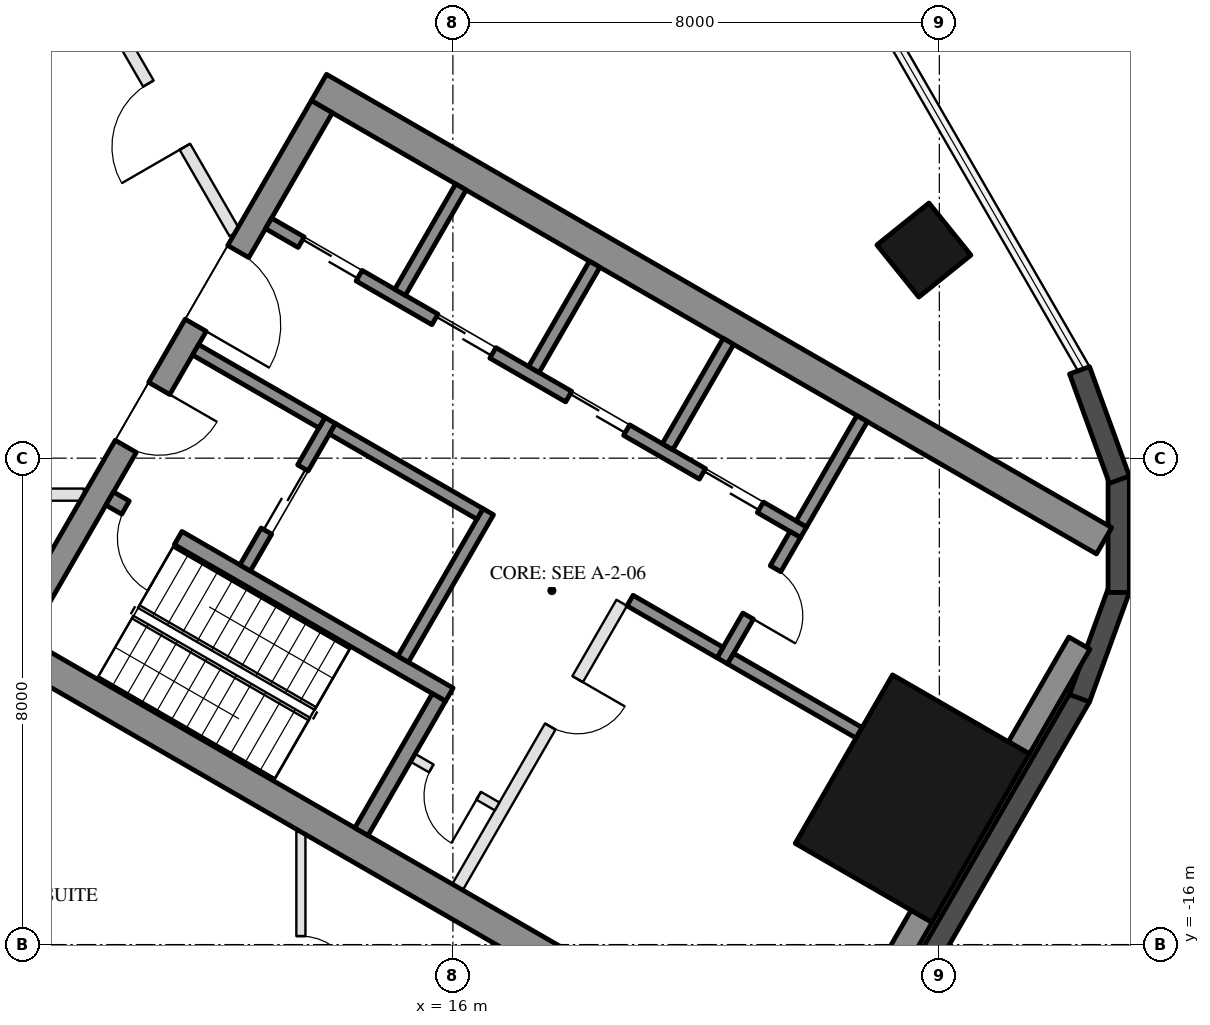
"""IFC4 building model, lengths in metres.
Left out: names, types, materials, properties, quantities, classifications, styles, units other than length and angle.
Written with IfcOpenShell. Run it as: python <this file> out.ifc"""

import sys

from ifc_helpers import new_model, si_unit, direction, frame, frame_2d, origin, origin_2d, place, context, subcontext, project, spatial, rectangle, hollow_rectangle, extrude, boolean, halfspace, element, fill, save


model = new_model("IFC4")
c1 = context("Model", 3, precision=1e-05, world=origin(), true_north=direction((0.0, 1.0)))
c2 = subcontext(c1, "Body", "Model", "MODEL_VIEW")
j1 = project(units=[si_unit("LENGTHUNIT", "METRE"), si_unit("PLANEANGLEUNIT", "RADIAN")], contexts=[c1])
p1 = place(None, origin())
s1 = spatial("IfcSite", under=j1, at=p1, CompositionType="ELEMENT")
p2 = place(p1, origin())
s2 = spatial("IfcBuilding", under=s1, at=p2, CompositionType="ELEMENT")
p3 = place(p2, frame((0.0, 0.0, 33.0)))
s3 = spatial("IfcBuildingStorey", under=s2, at=p3, CompositionType="ELEMENT", Elevation=33.0)
p4 = place(p3, frame((23.746, -4.577, 0.0), z_axis=(-0.01301970202, 0.00206145282, 0.999913115111), x_axis=(0.497599356322, -0.867367587298, 0.008267351011)))
e1 = element("IfcColumn", 1, at=p4, inside=s3, PredefinedType="COLUMN", context=c2, shape_type="SweptSolid", body=[
    boolean("DIFFERENCE", boolean("DIFFERENCE", extrude(hollow_rectangle(XDim=1.1, YDim=1.1, WallThickness=0.05, at=origin_2d()), origin(), (0.0, 0.0, 1.0), 4.5), halfspace(frame((0.0, 0.0, 0.012), z_axis=(0.0, 0.0, 1.0), x_axis=(1.0, 0.0, 0.0)), True)), halfspace(frame((0.0, 0.0, 4.493), z_axis=(0.0, 0.0, 1.0), x_axis=(1.0, 0.0, 0.0)), False)),
])
p5 = place(p3, frame((23.556, -13.6, 0.0), z_axis=(0.0, 0.0, 1.0), x_axis=(0.5, 0.866025403784, 0.0)))
e2 = element("IfcColumn", 2, at=p5, inside=s3, PredefinedType="COLUMN", context=c2, shape_type="SweptSolid", body=[
    extrude(hollow_rectangle(XDim=3.2, YDim=2.6, WallThickness=0.08, at=origin_2d()), origin(), (0.0, 0.0, 1.0), 4.5),
])
p6 = place(p3, frame((23.483, -16.832, 0.0), z_axis=(0.0, 0.0, 1.0), x_axis=(0.499982068559, 0.866035756259, 0.0)))
e3 = element("IfcWall", 3, at=p6, inside=s3, PredefinedType="SOLIDWALL", context=c2, shape_type="SweptSolid", body=[
    extrude(rectangle(XDim=5.671, YDim=0.35, at=frame_2d((2.835, 0.0))), origin(), (0.0, 0.0, 1.0), 4.2),
])
for number, where, z_axis, x_axis in (
    (4, (26.305, -11.948, 0.0), (0.0, 0.0, 1.0), (0.342, 0.94, 0.0)),
    (5, (26.95, -10.209, 0.0), (0.0, 0.0, 1.0), (0.0, 1.0, 0.0)),
    (6, (26.96, -8.354, 0.0), (0.0, 0.0, 1.0), (-0.342, 0.94, 0.0)),
):
    element("IfcWall", number, at=place(p3, frame(where, z_axis=z_axis, x_axis=x_axis)), inside=s3, PredefinedType="SOLIDWALL", context=c2, shape_type="SweptSolid", body=[
        extrude(rectangle(XDim=1.915, YDim=0.35, at=frame_2d((0.957, 0.0))), origin(), (0.0, 0.0, 1.0), 4.2),
    ])
for number, where, z_axis, x_axis in (
    (7, (8.547, -10.997, 0.0), (0.0, 0.0, 1.0), (0.866, -0.5, 0.0)),
    (8, (13.797, -1.903, 0.0), (0.0, 0.0, 1.0), (0.866, -0.5, 0.0)),
):
    element("IfcWall", number, at=place(p3, frame(where, z_axis=z_axis, x_axis=x_axis)), inside=s3, PredefinedType="SHEAR", context=c2, shape_type="SweptSolid", body=[
        extrude(rectangle(XDim=14.91, YDim=0.5, at=frame_2d((7.455, 0.0))), origin(), (0.0, 0.0, 1.0), 4.2),
    ])
p7 = place(p3, frame((8.845, -10.88, 0.0), z_axis=(0.0, 0.0, 1.0), x_axis=(0.500004234368, 0.866022959057, 0.0)))
e9 = element("IfcWall", 9, at=p7, inside=s3, PredefinedType="SHEAR", context=c2, shape_type="SweptSolid", body=[
    extrude(rectangle(XDim=10.0, YDim=0.4, at=frame_2d((5.0, 0.0))), origin(), (0.0, 0.0, 1.0), 4.2),
])
p8 = place(p7, frame((3.55, 0.0, 0.0)))
e10 = element("IfcOpeningElement", 10, at=p8, cuts=e9, PredefinedType="OPENING", context=c2, shape_type="SweptSolid", body=[
    extrude(rectangle(XDim=1.1, YDim=2.1, at=frame_2d((0.55, 1.05))), frame((0.0, 0.21, 0.0), z_axis=(0.0, -1.0, 0.0), x_axis=(1.0, 0.0, 0.0)), (0.0, 0.0, 1.0), 0.42),
])
p9 = place(p7, frame((5.85, 0.0, 0.0)))
e11 = element("IfcOpeningElement", 11, at=p9, cuts=e9, PredefinedType="OPENING", context=c2, shape_type="SweptSolid", body=[
    extrude(rectangle(XDim=1.4, YDim=2.1, at=frame_2d((0.7, 1.05))), frame((0.0, 0.21, 0.0), z_axis=(0.0, -1.0, 0.0), x_axis=(1.0, 0.0, 0.0)), (0.0, 0.0, 1.0), 0.42),
])
for number, where, z_axis, x_axis in (
    (12, (25.309, -12.764, 0.0), (0.0, 0.0, 1.0), (0.5, 0.866, 0.0)),
    (13, (22.714, -17.258, 0.0), (0.0, 0.0, 1.0), (0.5, 0.866, 0.0)),
):
    element("IfcWall", number, at=place(p3, frame(where, z_axis=z_axis, x_axis=x_axis)), inside=s3, PredefinedType="SHEAR", context=c2, shape_type="SweptSolid", body=[
        extrude(rectangle(XDim=1.989, YDim=0.4, at=frame_2d((0.995, 0.0))), origin(), (0.0, 0.0, 1.0), 4.2),
    ])
p10 = place(p3, frame((10.356, -8.664, 0.0), z_axis=(0.0, 0.0, 1.0), x_axis=(0.866028629588, -0.499994412703, 0.0)))
e14 = element("IfcWall", 14, at=p10, inside=s3, PredefinedType="SHEAR", context=c2, shape_type="SweptSolid", body=[
    extrude(rectangle(XDim=6.45, YDim=0.25, at=frame_2d((3.225, 0.0))), origin(), (0.0, 0.0, 1.0), 4.2),
])
p11 = place(p10, frame((0.3, 0.0, 0.0)))
e15 = element("IfcOpeningElement", 15, at=p11, cuts=e14, PredefinedType="OPENING", context=c2, shape_type="SweptSolid", body=[
    extrude(rectangle(XDim=1.0, YDim=2.1, at=frame_2d((0.5, 1.05))), frame((0.0, 0.135, 0.0), z_axis=(0.0, -1.0, 0.0), x_axis=(1.0, 0.0, 0.0)), (0.0, 0.0, 1.0), 0.27),
])
p12 = place(p3, frame((14.496, -14.143, 0.0), z_axis=(0.0, 0.0, 1.0), x_axis=(0.500062241894, 0.865989465428, 0.0)))
e16 = element("IfcWall", 16, at=p12, inside=s3, PredefinedType="SHEAR", context=c2, shape_type="SweptSolid", body=[
    extrude(rectangle(XDim=2.55, YDim=0.25, at=frame_2d((1.275, 0.0))), origin(), (0.0, 0.0, 1.0), 4.2),
])
p13 = place(p3, frame((15.181, -11.305, 0.0), z_axis=(0.0, 0.0, 1.0), x_axis=(0.49994636267, 0.866056369097, 0.0)))
e17 = element("IfcWall", 17, at=p13, inside=s3, PredefinedType="SHEAR", context=c2, shape_type="SweptSolid", body=[
    extrude(rectangle(XDim=2.8, YDim=0.2, at=frame_2d((1.4, 0.0))), origin(), (0.0, 0.0, 1.0), 4.2),
])
p14 = place(p3, frame((12.583, -9.805, 0.0), z_axis=(0.0, 0.0, 1.0), x_axis=(0.49994636267, 0.866056369097, 0.0)))
e18 = element("IfcWall", 18, at=p14, inside=s3, PredefinedType="SHEAR", context=c2, shape_type="SweptSolid", body=[
    extrude(rectangle(XDim=2.8, YDim=0.2, at=frame_2d((1.4, 0.0))), origin(), (0.0, 0.0, 1.0), 4.2),
])
p15 = place(p14, frame((0.7, 0.0, 0.0)))
e19 = element("IfcOpeningElement", 19, at=p15, cuts=e18, PredefinedType="OPENING", context=c2, shape_type="SweptSolid", body=[
    extrude(rectangle(XDim=1.2, YDim=2.1, at=frame_2d((0.6, 1.05))), frame((0.0, 0.11, 0.0), z_axis=(0.0, -1.0, 0.0), x_axis=(1.0, 0.0, 0.0)), (0.0, 0.0, 1.0), 0.22),
])
p16 = place(p3, frame((11.768, -6.217, 0.0), z_axis=(0.0, 0.0, 1.0), x_axis=(0.866050077142, -0.499957262057, 0.0)))
e20 = element("IfcWall", 20, at=p16, inside=s3, PredefinedType="SHEAR", context=c2, shape_type="SweptSolid", body=[
    extrude(rectangle(XDim=2.4, YDim=0.2, at=frame_2d((1.2, 0.0))), origin(), (0.0, 0.0, 1.0), 4.2),
])
p17 = place(p3, frame((14.02, -7.517, 0.0), z_axis=(0.0, 0.0, 1.0), x_axis=(0.866034573852, -0.49998411664, 0.0)))
e21 = element("IfcWall", 21, at=p17, inside=s3, PredefinedType="SHEAR", context=c2, shape_type="SweptSolid", body=[
    extrude(rectangle(XDim=2.8, YDim=0.2, at=frame_2d((1.4, 0.0))), origin(), (0.0, 0.0, 1.0), 4.2),
])
p18 = place(p3, frame((12.968, -4.138, 0.0), z_axis=(0.0, 0.0, 1.0), x_axis=(0.866028328073, -0.49999493495, 0.0)))
e22 = element("IfcWall", 22, at=p18, inside=s3, PredefinedType="SHEAR", context=c2, shape_type="SweptSolid", body=[
    extrude(rectangle(XDim=10.16, YDim=0.2, at=frame_2d((5.08, 0.0))), origin(), (0.0, 0.0, 1.0), 4.2),
])
p19 = place(p18, frame((0.62, 0.0, 0.0)))
e23 = element("IfcOpeningElement", 23, at=p19, cuts=e22, PredefinedType="OPENING", context=c2, shape_type="SweptSolid", body=[
    extrude(rectangle(XDim=1.1, YDim=2.1, at=frame_2d((0.55, 1.05))), frame((0.0, 0.11, 0.0), z_axis=(0.0, -1.0, 0.0), x_axis=(1.0, 0.0, 0.0)), (0.0, 0.0, 1.0), 0.22),
])
p20 = place(p18, frame((3.16, 0.0, 0.0)))
e24 = element("IfcOpeningElement", 24, at=p20, cuts=e22, PredefinedType="OPENING", context=c2, shape_type="SweptSolid", body=[
    extrude(rectangle(XDim=1.1, YDim=2.1, at=frame_2d((0.55, 1.05))), frame((0.0, 0.11, 0.0), z_axis=(0.0, -1.0, 0.0), x_axis=(1.0, 0.0, 0.0)), (0.0, 0.0, 1.0), 0.22),
])
p21 = place(p18, frame((5.7, 0.0, 0.0)))
e25 = element("IfcOpeningElement", 25, at=p21, cuts=e22, PredefinedType="OPENING", context=c2, shape_type="SweptSolid", body=[
    extrude(rectangle(XDim=1.1, YDim=2.1, at=frame_2d((0.55, 1.05))), frame((0.0, 0.11, 0.0), z_axis=(0.0, -1.0, 0.0), x_axis=(1.0, 0.0, 0.0)), (0.0, 0.0, 1.0), 0.22),
])
p22 = place(p18, frame((8.24, 0.0, 0.0)))
e26 = element("IfcOpeningElement", 26, at=p22, cuts=e22, PredefinedType="OPENING", context=c2, shape_type="SweptSolid", body=[
    extrude(rectangle(XDim=1.1, YDim=2.1, at=frame_2d((0.55, 1.05))), frame((0.0, 0.11, 0.0), z_axis=(0.0, -1.0, 0.0), x_axis=(1.0, 0.0, 0.0)), (0.0, 0.0, 1.0), 0.22),
])
p23 = place(p3, frame((20.43, -11.333, 0.0), z_axis=(0.0, 0.0, 1.0), x_axis=(0.500001309137, 0.866024647952, 0.0)))
e27 = element("IfcWall", 27, at=p23, inside=s3, PredefinedType="SHEAR", context=c2, shape_type="SweptSolid", body=[
    extrude(rectangle(XDim=2.4, YDim=0.2, at=frame_2d((1.2, 0.0))), origin(), (0.0, 0.0, 1.0), 4.2),
])
p24 = place(p23, frame((0.85, 0.0, 0.0)))
e28 = element("IfcOpeningElement", 28, at=p24, cuts=e27, PredefinedType="OPENING", context=c2, shape_type="SweptSolid", body=[
    extrude(rectangle(XDim=0.9, YDim=2.1, at=frame_2d((0.45, 1.05))), frame((0.0, 0.11, 0.0), z_axis=(0.0, -1.0, 0.0), x_axis=(1.0, 0.0, 0.0)), (0.0, 0.0, 1.0), 0.22),
])
p25 = place(p3, frame((18.913, -10.342, 0.0), z_axis=(0.0, 0.0, 1.0), x_axis=(0.866038183914, -0.499977863513, 0.0)))
e29 = element("IfcWall", 29, at=p25, inside=s3, PredefinedType="SHEAR", context=c2, shape_type="SweptSolid", body=[
    extrude(rectangle(XDim=1.71, YDim=0.2, at=frame_2d((0.855, 0.0))), origin(), (0.0, 0.0, 1.0), 4.2),
])
for number, where, z_axis, x_axis in (
    (30, (15.131, -5.272, 0.0), (0.0, 0.0, 1.0), (0.5, 0.866, 0.0)),
    (31, (17.331, -6.542, 0.0), (0.0, 0.0, 1.0), (0.5, 0.866, 0.0)),
    (32, (19.531, -7.812, 0.0), (0.0, 0.0, 1.0), (0.5, 0.866, 0.0)),
    (33, (21.73, -9.082, 0.0), (0.0, 0.0, 1.0), (0.5, 0.866, 0.0)),
):
    element("IfcWall", number, at=place(p3, frame(where, z_axis=z_axis, x_axis=x_axis)), inside=s3, PredefinedType="SHEAR", context=c2, shape_type="SweptSolid", body=[
        extrude(rectangle(XDim=2.0, YDim=0.2, at=frame_2d((1.0, 0.0))), origin(), (0.0, 0.0, 1.0), 4.2),
    ])
p26 = place(p3, frame((20.567, -11.297, 0.0), z_axis=(0.0, 0.0, 1.0), x_axis=(0.866048967903, -0.499959183527, 0.0)))
e34 = element("IfcWall", 34, at=p26, inside=s3, PredefinedType="SHEAR", context=c2, shape_type="SweptSolid", body=[
    extrude(rectangle(XDim=2.44, YDim=0.2, at=frame_2d((1.22, 0.0))), origin(), (0.0, 0.0, 1.0), 4.2),
])
p27 = place(p3, frame((16.076, -15.055, 0.0), z_axis=(0.0, 0.0, 1.0), x_axis=(0.499995103361, 0.866028230842, 0.0)))
e35 = element("IfcWall", 35, at=p27, inside=s3, PredefinedType="PARTITIONING", context=c2, shape_type="SweptSolid", body=[
    extrude(rectangle(XDim=5.4, YDim=0.2, at=frame_2d((2.7, 0.0))), origin(), (0.0, 0.0, 1.0), 4.2),
])
p28 = place(p27, frame((3.05, 0.0, 0.0)))
e36 = element("IfcOpeningElement", 36, at=p28, cuts=e35, PredefinedType="OPENING", context=c2, shape_type="SweptSolid", body=[
    extrude(rectangle(XDim=0.9, YDim=2.1, at=frame_2d((0.45, 1.05))), frame((0.0, 0.11, 0.0), z_axis=(0.0, -1.0, 0.0), x_axis=(1.0, 0.0, 0.0)), (0.0, 0.0, 1.0), 0.22),
])
p29 = place(p3, frame((15.342, -12.928, 0.0), z_axis=(0.0, 0.0, 1.0), x_axis=(0.865989903783, -0.500061482766, 0.0)))
e37 = element("IfcWall", 37, at=p29, inside=s3, PredefinedType="PARTITIONING", context=c2, shape_type="SweptSolid", body=[
    extrude(rectangle(XDim=1.6, YDim=0.15, at=frame_2d((0.8, 0.0))), origin(), (0.0, 0.0, 1.0), 4.2),
])
p30 = place(p29, frame((0.35, 0.0, 0.0)))
e38 = element("IfcOpeningElement", 38, at=p30, cuts=e37, PredefinedType="OPENING", context=c2, shape_type="SweptSolid", body=[
    extrude(rectangle(XDim=0.9, YDim=2.1, at=frame_2d((0.45, 1.05))), frame((0.0, 0.085, 0.0), z_axis=(0.0, -1.0, 0.0), x_axis=(1.0, 0.0, 0.0)), (0.0, 0.0, 1.0), 0.17),
])
p31 = place(p3, frame((13.5, -19.476, 0.0), z_axis=(0.0, 0.0, 1.0), x_axis=(0.0, 1.0, 0.0)))
e39 = element("IfcWall", 39, at=p31, inside=s3, PredefinedType="PARTITIONING", context=c2, shape_type="SweptSolid", body=[
    extrude(rectangle(XDim=5.331, YDim=0.15, at=frame_2d((2.666, 0.0))), origin(), (0.0, 0.0, 1.0), 4.2),
])
p32 = place(p31, frame((2.716, 0.0, 0.0)))
e40 = element("IfcOpeningElement", 40, at=p32, cuts=e39, PredefinedType="OPENING", context=c2, shape_type="SweptSolid", body=[
    extrude(rectangle(XDim=0.9, YDim=2.1, at=frame_2d((0.45, 1.05))), frame((0.0, 0.085, 0.0), z_axis=(0.0, -1.0, 0.0), x_axis=(1.0, 0.0, 0.0)), (0.0, 0.0, 1.0), 0.17),
])
p33 = place(p3, frame((-9.93, -8.6, 0.0), z_axis=(0.0, 0.0, 1.0), x_axis=(1.0, 0.0, 0.0)))
e41 = element("IfcWall", 41, at=p33, inside=s3, PredefinedType="PARTITIONING", context=c2, shape_type="SweptSolid", body=[
    extrude(rectangle(XDim=19.861, YDim=0.2, at=frame_2d((9.93, 0.0))), origin(), (0.0, 0.0, 1.0), 3.41),
])
p34 = place(p33, frame((2.234, 0.0, 0.0)))
e42 = element("IfcOpeningElement", 42, at=p34, cuts=e41, PredefinedType="OPENING", context=c2, shape_type="SweptSolid", body=[
    extrude(rectangle(XDim=1.5, YDim=2.1, at=frame_2d((0.75, 1.05))), frame((0.0, 0.11, 0.0), z_axis=(0.0, -1.0, 0.0), x_axis=(1.0, 0.0, 0.0)), (0.0, 0.0, 1.0), 0.22),
])
p35 = place(p33, frame((12.278, 0.0, 0.0)))
e43 = element("IfcOpeningElement", 43, at=p35, cuts=e41, PredefinedType="OPENING", context=c2, shape_type="SweptSolid", body=[
    extrude(rectangle(XDim=1.2, YDim=2.1, at=frame_2d((0.6, 1.05))), frame((0.0, 0.11, 0.0), z_axis=(0.0, -1.0, 0.0), x_axis=(1.0, 0.0, 0.0)), (0.0, 0.0, 1.0), 0.22),
])
p36 = place(p3, frame((12.413, -4.3, 0.0), z_axis=(0.0, 0.0, 1.0), x_axis=(-0.50000478328, 0.866022642139, 0.0)))
e44 = element("IfcWall", 44, at=p36, inside=s3, PredefinedType="PARTITIONING", context=c2, shape_type="SweptSolid", body=[
    extrude(rectangle(XDim=19.861, YDim=0.2, at=frame_2d((9.931, 0.0))), origin(), (0.0, 0.0, 1.0), 3.41),
])
p37 = place(p36, frame((1.642, 0.0, 0.0)))
e45 = element("IfcOpeningElement", 45, at=p37, cuts=e44, PredefinedType="OPENING", context=c2, shape_type="SweptSolid", body=[
    extrude(rectangle(XDim=1.2, YDim=2.1, at=frame_2d((0.6, 1.05))), frame((0.0, 0.11, 0.0), z_axis=(0.0, -1.0, 0.0), x_axis=(1.0, 0.0, 0.0)), (0.0, 0.0, 1.0), 0.22),
])
p38 = place(p36, frame((6.125, 0.0, 0.0)))
e46 = element("IfcOpeningElement", 46, at=p38, cuts=e44, PredefinedType="OPENING", context=c2, shape_type="SweptSolid", body=[
    extrude(rectangle(XDim=1.2, YDim=2.1, at=frame_2d((0.6, 1.05))), frame((0.0, 0.11, 0.0), z_axis=(0.0, -1.0, 0.0), x_axis=(1.0, 0.0, 0.0)), (0.0, 0.0, 1.0), 0.22),
])
p39 = place(p36, frame((9.918, 0.0, 0.0)))
e47 = element("IfcOpeningElement", 47, at=p39, cuts=e44, PredefinedType="OPENING", context=c2, shape_type="SweptSolid", body=[
    extrude(rectangle(XDim=1.0, YDim=2.1, at=frame_2d((0.5, 1.05))), frame((0.0, 0.11, 0.0), z_axis=(0.0, -1.0, 0.0), x_axis=(1.0, 0.0, 0.0)), (0.0, 0.0, 1.0), 0.22),
])
p40 = place(p36, frame((17.34, 0.0, 0.0)))
e48 = element("IfcOpeningElement", 48, at=p40, cuts=e44, PredefinedType="OPENING", context=c2, shape_type="SweptSolid", body=[
    extrude(rectangle(XDim=1.5, YDim=2.1, at=frame_2d((0.75, 1.05))), frame((0.0, 0.11, 0.0), z_axis=(0.0, -1.0, 0.0), x_axis=(1.0, 0.0, 0.0)), (0.0, 0.0, 1.0), 0.22),
])
p41 = place(p36, frame((13.23, 0.0, 0.0)))
e49 = element("IfcOpeningElement", 49, at=p41, cuts=e44, PredefinedType="OPENING", context=c2, shape_type="SweptSolid", body=[
    extrude(rectangle(XDim=1.8, YDim=2.1, at=frame_2d((0.9, 1.05))), frame((0.0, 0.11, 0.0), z_axis=(0.0, -1.0, 0.0), x_axis=(1.0, 0.0, 0.0)), (0.0, 0.0, 1.0), 0.22),
])
p42 = place(p15, origin())
e50 = element("IfcDoor", 50, at=p42, inside=s3, OperationType="DOUBLE_DOOR_SLIDING", PredefinedType="DOOR", context=c2, shape_type="SweptSolid", body=[
    extrude(rectangle(XDim=1.2, YDim=2.1, at=frame_2d((0.6, 1.05))), frame((0.0, 0.025, 0.0), z_axis=(0.0, -1.0, 0.0), x_axis=(1.0, 0.0, 0.0)), (0.0, 0.0, 1.0), 0.05),
])
fill(e19, e50)
p43 = place(p30, frame((0.9, 0.0, 0.0), z_axis=(0.0, 0.0, 1.0), x_axis=(-1.0, 0.0, 0.0)))
e51 = element("IfcDoor", 51, at=p43, inside=s3, OperationType="SINGLE_SWING_LEFT", PredefinedType="DOOR", context=c2, shape_type="SweptSolid", body=[
    extrude(rectangle(XDim=0.9, YDim=2.1, at=frame_2d((0.45, 1.05))), frame((0.0, 0.025, 0.0), z_axis=(0.0, -1.0, 0.0), x_axis=(1.0, 0.0, 0.0)), (0.0, 0.0, 1.0), 0.05),
])
fill(e38, e51)
p44 = place(p19, origin())
e52 = element("IfcDoor", 52, at=p44, inside=s3, OperationType="DOUBLE_DOOR_SLIDING", PredefinedType="DOOR", context=c2, shape_type="SweptSolid", body=[
    extrude(rectangle(XDim=1.1, YDim=2.1, at=frame_2d((0.55, 1.05))), frame((0.0, 0.025, 0.0), z_axis=(0.0, -1.0, 0.0), x_axis=(1.0, 0.0, 0.0)), (0.0, 0.0, 1.0), 0.05),
])
fill(e23, e52)
p45 = place(p20, origin())
e53 = element("IfcDoor", 53, at=p45, inside=s3, OperationType="DOUBLE_DOOR_SLIDING", PredefinedType="DOOR", context=c2, shape_type="SweptSolid", body=[
    extrude(rectangle(XDim=1.1, YDim=2.1, at=frame_2d((0.55, 1.05))), frame((0.0, 0.025, 0.0), z_axis=(0.0, -1.0, 0.0), x_axis=(1.0, 0.0, 0.0)), (0.0, 0.0, 1.0), 0.05),
])
fill(e24, e53)
p46 = place(p21, origin())
e54 = element("IfcDoor", 54, at=p46, inside=s3, OperationType="DOUBLE_DOOR_SLIDING", PredefinedType="DOOR", context=c2, shape_type="SweptSolid", body=[
    extrude(rectangle(XDim=1.1, YDim=2.1, at=frame_2d((0.55, 1.05))), frame((0.0, 0.025, 0.0), z_axis=(0.0, -1.0, 0.0), x_axis=(1.0, 0.0, 0.0)), (0.0, 0.0, 1.0), 0.05),
])
fill(e25, e54)
p47 = place(p22, origin())
e55 = element("IfcDoor", 55, at=p47, inside=s3, OperationType="DOUBLE_DOOR_SLIDING", PredefinedType="DOOR", context=c2, shape_type="SweptSolid", body=[
    extrude(rectangle(XDim=1.1, YDim=2.1, at=frame_2d((0.55, 1.05))), frame((0.0, 0.025, 0.0), z_axis=(0.0, -1.0, 0.0), x_axis=(1.0, 0.0, 0.0)), (0.0, 0.0, 1.0), 0.05),
])
fill(e26, e55)
p48 = place(p24, frame((0.9, 0.0, 0.0), z_axis=(0.0, 0.0, 1.0), x_axis=(-1.0, 0.0, 0.0)))
e56 = element("IfcDoor", 56, at=p48, inside=s3, OperationType="SINGLE_SWING_RIGHT", PredefinedType="DOOR", context=c2, shape_type="SweptSolid", body=[
    extrude(rectangle(XDim=0.9, YDim=2.1, at=frame_2d((0.45, 1.05))), frame((0.0, 0.025, 0.0), z_axis=(0.0, -1.0, 0.0), x_axis=(1.0, 0.0, 0.0)), (0.0, 0.0, 1.0), 0.05),
])
fill(e28, e56)
p49 = place(p28, frame((0.9, 0.0, 0.0), z_axis=(0.0, 0.0, 1.0), x_axis=(-1.0, 0.0, 0.0)))
e57 = element("IfcDoor", 57, at=p49, inside=s3, OperationType="SINGLE_SWING_LEFT", PredefinedType="DOOR", context=c2, shape_type="SweptSolid", body=[
    extrude(rectangle(XDim=0.9, YDim=2.1, at=frame_2d((0.45, 1.05))), frame((0.0, 0.025, 0.0), z_axis=(0.0, -1.0, 0.0), x_axis=(1.0, 0.0, 0.0)), (0.0, 0.0, 1.0), 0.05),
])
fill(e36, e57)
p50 = place(p8, frame((1.1, 0.0, 0.0), z_axis=(0.0, 0.0, 1.0), x_axis=(-1.0, 0.0, 0.0)))
e58 = element("IfcDoor", 58, at=p50, inside=s3, OperationType="SINGLE_SWING_LEFT", PredefinedType="DOOR", context=c2, shape_type="SweptSolid", body=[
    extrude(rectangle(XDim=1.1, YDim=2.1, at=frame_2d((0.55, 1.05))), frame((0.0, 0.025, 0.0), z_axis=(0.0, -1.0, 0.0), x_axis=(1.0, 0.0, 0.0)), (0.0, 0.0, 1.0), 0.05),
])
fill(e10, e58)
p51 = place(p9, frame((1.4, 0.0, 0.0), z_axis=(0.0, 0.0, 1.0), x_axis=(-1.0, 0.0, 0.0)))
e59 = element("IfcDoor", 59, at=p51, inside=s3, OperationType="DOUBLE_DOOR_SINGLE_SWING", PredefinedType="DOOR", context=c2, shape_type="SweptSolid", body=[
    extrude(rectangle(XDim=1.4, YDim=2.1, at=frame_2d((0.7, 1.05))), frame((0.0, 0.025, 0.0), z_axis=(0.0, -1.0, 0.0), x_axis=(1.0, 0.0, 0.0)), (0.0, 0.0, 1.0), 0.05),
])
fill(e11, e59)
p52 = place(p11, frame((1.0, 0.0, 0.0), z_axis=(0.0, 0.0, 1.0), x_axis=(-1.0, 0.0, 0.0)))
e60 = element("IfcDoor", 60, at=p52, inside=s3, OperationType="SINGLE_SWING_LEFT", PredefinedType="DOOR", context=c2, shape_type="SweptSolid", body=[
    extrude(rectangle(XDim=1.0, YDim=2.1, at=frame_2d((0.5, 1.05))), frame((0.0, 0.025, 0.0), z_axis=(0.0, -1.0, 0.0), x_axis=(1.0, 0.0, 0.0)), (0.0, 0.0, 1.0), 0.05),
])
fill(e15, e60)
p53 = place(p37, origin())
e61 = element("IfcDoor", 61, at=p53, inside=s3, OperationType="SINGLE_SWING_LEFT", PredefinedType="DOOR", context=c2, shape_type="SweptSolid", body=[
    extrude(rectangle(XDim=1.2, YDim=2.1, at=frame_2d((0.6, 1.05))), frame((0.0, 0.025, 0.0), z_axis=(0.0, -1.0, 0.0), x_axis=(1.0, 0.0, 0.0)), (0.0, 0.0, 1.0), 0.05),
])
fill(e45, e61)
p54 = place(p32, frame((0.9, 0.0, 0.0), z_axis=(0.0, 0.0, 1.0), x_axis=(-1.0, 0.0, 0.0)))
e62 = element("IfcDoor", 62, at=p54, inside=s3, OperationType="SINGLE_SWING_RIGHT", PredefinedType="DOOR", context=c2, shape_type="SweptSolid", body=[
    extrude(rectangle(XDim=0.9, YDim=2.1, at=frame_2d((0.45, 1.05))), frame((0.0, 0.025, 0.0), z_axis=(0.0, -1.0, 0.0), x_axis=(1.0, 0.0, 0.0)), (0.0, 0.0, 1.0), 0.05),
])
fill(e40, e62)
save(model, sys.argv[1])
